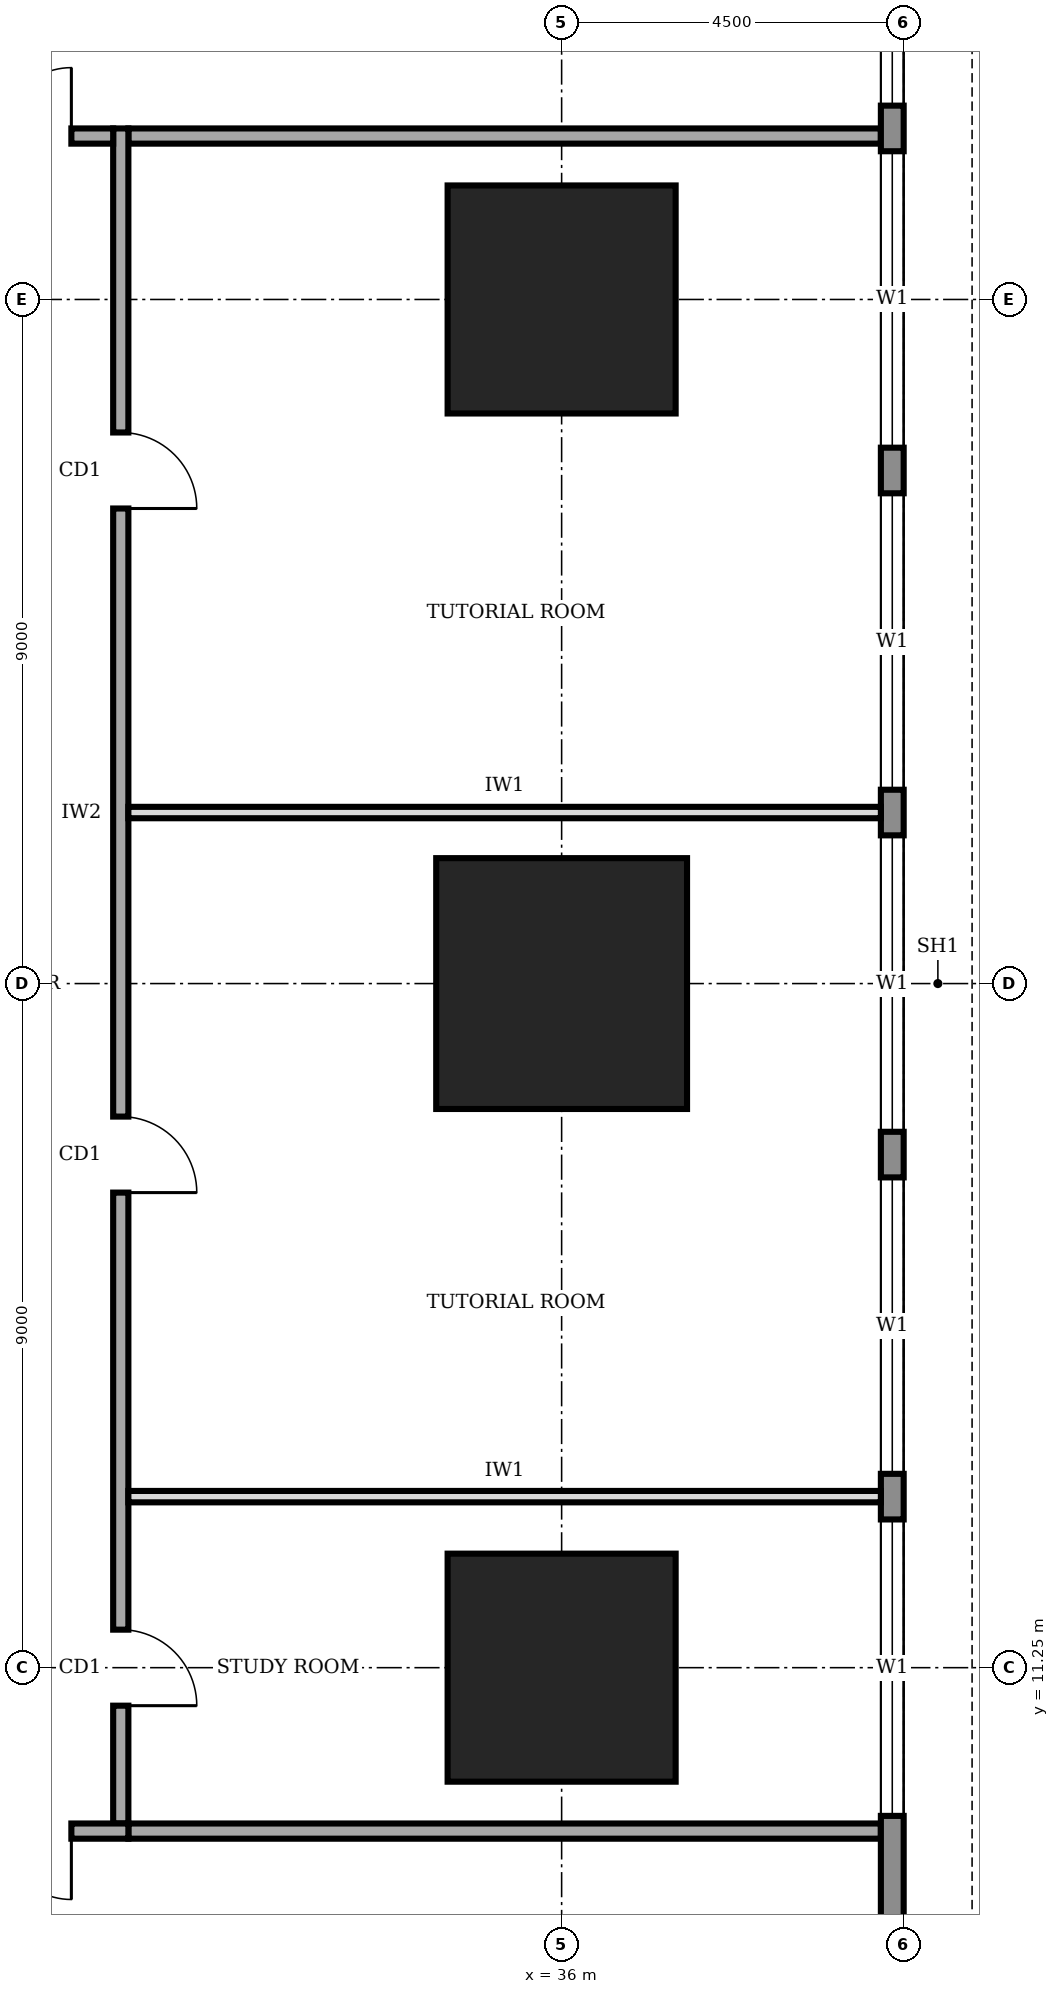
"""IFC4 building model, lengths in metres.
Left out: names, types, materials, properties, quantities, classifications, styles, units other than length and angle.
Written with IfcOpenShell. Run it as: python <this file> out.ifc"""

import sys

from ifc_helpers import new_model, si_unit, direction, frame, frame_2d, origin, origin_2d, place, context, subcontext, project, spatial, rectangle, extrude, element, fill, save


model = new_model("IFC4")
c1 = context("Model", 3, precision=1e-05, world=origin(), true_north=direction((0.0, 1.0)))
c2 = subcontext(c1, "Body", "Model", "MODEL_VIEW")
j1 = project(units=[si_unit("LENGTHUNIT", "METRE"), si_unit("PLANEANGLEUNIT", "RADIAN")], contexts=[c1])
p1 = place(None, origin())
s1 = spatial("IfcSite", under=j1, at=p1, CompositionType="ELEMENT")
p2 = place(p1, origin())
s2 = spatial("IfcBuilding", under=s1, at=p2, CompositionType="ELEMENT")
p3 = place(p2, frame((0.0, 0.0, 45.0)))
s3 = spatial("IfcBuildingStorey", under=s2, at=p3, CompositionType="ELEMENT", Elevation=45.0)
p4 = place(p3, frame((36.0, 11.25, 0.0), z_axis=(0.0, 0.0, 1.0), x_axis=(1.0, 0.0, 0.0)))
e1 = element("IfcColumn", 1, at=p4, inside=s3, PredefinedType="COLUMN", context=c2, shape_type="SweptSolid", body=[
    extrude(rectangle(XDim=3.0, YDim=3.0, at=origin_2d()), origin(), (0.0, 0.0, 1.0), 4.0),
])
p5 = place(p3, frame((36.0, 20.25, 0.0), z_axis=(0.0, 0.0, 1.0), x_axis=(1.0, 0.0, 0.0)))
e2 = element("IfcColumn", 2, at=p5, inside=s3, PredefinedType="COLUMN", context=c2, shape_type="SweptSolid", body=[
    extrude(rectangle(XDim=3.3, YDim=3.3, at=origin_2d()), origin(), (0.0, 0.0, 1.0), 4.0),
])
p6 = place(p3, frame((36.0, 29.25, 0.0), z_axis=(0.0, 0.0, 1.0), x_axis=(1.0, 0.0, 0.0)))
e3 = element("IfcColumn", 3, at=p6, inside=s3, PredefinedType="COLUMN", context=c2, shape_type="SweptSolid", body=[
    extrude(rectangle(XDim=3.0, YDim=3.0, at=origin_2d()), origin(), (0.0, 0.0, 1.0), 4.0),
])
p7 = place(p3, frame((40.35, 4.52, 0.0), z_axis=(0.0, 0.0, 1.0), x_axis=(0.0, 1.0, 0.0)))
e4 = element("IfcWall", 4, at=p7, inside=s3, PredefinedType="STANDARD", context=c2, shape_type="SweptSolid", body=[
    extrude(rectangle(XDim=31.46, YDim=0.3, at=frame_2d((15.73, 0.0))), origin(), (0.0, 0.0, 1.0), 3.75),
])
p8 = place(p7, frame((4.78, 0.0, 0.9)))
e5 = element("IfcOpeningElement", 5, at=p8, cuts=e4, PredefinedType="OPENING", context=c2, shape_type="SweptSolid", body=[
    extrude(rectangle(XDim=3.9, YDim=2.2, at=frame_2d((1.95, 1.1))), frame((0.0, 0.16, 0.0), z_axis=(0.0, -1.0, 0.0), x_axis=(1.0, 0.0, 0.0)), (0.0, 0.0, 1.0), 0.32),
])
p9 = place(p7, frame((9.28, 0.0, 0.9)))
e6 = element("IfcOpeningElement", 6, at=p9, cuts=e4, PredefinedType="OPENING", context=c2, shape_type="SweptSolid", body=[
    extrude(rectangle(XDim=3.9, YDim=2.2, at=frame_2d((1.95, 1.1))), frame((0.0, 0.16, 0.0), z_axis=(0.0, -1.0, 0.0), x_axis=(1.0, 0.0, 0.0)), (0.0, 0.0, 1.0), 0.32),
])
p10 = place(p7, frame((13.78, 0.0, 0.9)))
e7 = element("IfcOpeningElement", 7, at=p10, cuts=e4, PredefinedType="OPENING", context=c2, shape_type="SweptSolid", body=[
    extrude(rectangle(XDim=3.9, YDim=2.2, at=frame_2d((1.95, 1.1))), frame((0.0, 0.16, 0.0), z_axis=(0.0, -1.0, 0.0), x_axis=(1.0, 0.0, 0.0)), (0.0, 0.0, 1.0), 0.32),
])
p11 = place(p7, frame((18.28, 0.0, 0.9)))
e8 = element("IfcOpeningElement", 8, at=p11, cuts=e4, PredefinedType="OPENING", context=c2, shape_type="SweptSolid", body=[
    extrude(rectangle(XDim=3.9, YDim=2.2, at=frame_2d((1.95, 1.1))), frame((0.0, 0.16, 0.0), z_axis=(0.0, -1.0, 0.0), x_axis=(1.0, 0.0, 0.0)), (0.0, 0.0, 1.0), 0.32),
])
p12 = place(p7, frame((22.78, 0.0, 0.9)))
e9 = element("IfcOpeningElement", 9, at=p12, cuts=e4, PredefinedType="OPENING", context=c2, shape_type="SweptSolid", body=[
    extrude(rectangle(XDim=3.9, YDim=2.2, at=frame_2d((1.95, 1.1))), frame((0.0, 0.16, 0.0), z_axis=(0.0, -1.0, 0.0), x_axis=(1.0, 0.0, 0.0)), (0.0, 0.0, 1.0), 0.32),
])
p13 = place(p7, frame((27.28, 0.0, 0.9)))
e10 = element("IfcOpeningElement", 10, at=p13, cuts=e4, PredefinedType="OPENING", context=c2, shape_type="SweptSolid", body=[
    extrude(rectangle(XDim=3.9, YDim=2.2, at=frame_2d((1.95, 1.1))), frame((0.0, 0.16, 0.0), z_axis=(0.0, -1.0, 0.0), x_axis=(1.0, 0.0, 0.0)), (0.0, 0.0, 1.0), 0.32),
])
p14 = place(p3, frame((11.9, 9.1, 0.0), z_axis=(0.0, 0.0, 1.0), x_axis=(1.0, 0.0, 0.0)))
e11 = element("IfcWall", 11, at=p14, inside=s3, PredefinedType="SOLIDWALL", context=c2, shape_type="SweptSolid", body=[
    extrude(rectangle(XDim=18.4, YDim=0.2, at=frame_2d((9.2, 0.0))), origin(), (0.0, 0.0, 1.0), 3.75),
])
p15 = place(p14, frame((0.275, 0.0, 0.0)))
e12 = element("IfcOpeningElement", 12, at=p15, cuts=e11, PredefinedType="OPENING", context=c2, shape_type="SweptSolid", body=[
    extrude(rectangle(XDim=1.0, YDim=2.1, at=frame_2d((0.5, 1.05))), frame((0.0, 0.11, 0.0), z_axis=(0.0, -1.0, 0.0), x_axis=(1.0, 0.0, 0.0)), (0.0, 0.0, 1.0), 0.22),
])
p16 = place(p14, frame((3.35, 0.0, 0.0)))
e13 = element("IfcOpeningElement", 13, at=p16, cuts=e11, PredefinedType="OPENING", context=c2, shape_type="SweptSolid", body=[
    extrude(rectangle(XDim=1.0, YDim=2.1, at=frame_2d((0.5, 1.05))), frame((0.0, 0.11, 0.0), z_axis=(0.0, -1.0, 0.0), x_axis=(1.0, 0.0, 0.0)), (0.0, 0.0, 1.0), 0.22),
])
p17 = place(p14, frame((10.1, 0.0, 0.0)))
e14 = element("IfcOpeningElement", 14, at=p17, cuts=e11, PredefinedType="OPENING", context=c2, shape_type="SweptSolid", body=[
    extrude(rectangle(XDim=1.0, YDim=2.1, at=frame_2d((0.5, 1.05))), frame((0.0, 0.11, 0.0), z_axis=(0.0, -1.0, 0.0), x_axis=(1.0, 0.0, 0.0)), (0.0, 0.0, 1.0), 0.22),
])
p18 = place(p14, frame((15.85, 0.0, 0.0)))
e15 = element("IfcOpeningElement", 15, at=p18, cuts=e11, PredefinedType="OPENING", context=c2, shape_type="SweptSolid", body=[
    extrude(rectangle(XDim=1.8, YDim=2.1, at=frame_2d((0.9, 1.05))), frame((0.0, 0.11, 0.0), z_axis=(0.0, -1.0, 0.0), x_axis=(1.0, 0.0, 0.0)), (0.0, 0.0, 1.0), 0.22),
])
p19 = place(p3, frame((30.2, 9.2, 0.0), z_axis=(0.0, 0.0, 1.0), x_axis=(0.0, 1.0, 0.0)))
e16 = element("IfcWall", 16, at=p19, inside=s3, PredefinedType="SOLIDWALL", context=c2, shape_type="SweptSolid", body=[
    extrude(rectangle(XDim=22.3, YDim=0.2, at=frame_2d((11.15, 0.0))), origin(), (0.0, 0.0, 1.0), 3.75),
])
p20 = place(p19, frame((1.55, 0.0, 0.0)))
e17 = element("IfcOpeningElement", 17, at=p20, cuts=e16, PredefinedType="OPENING", context=c2, shape_type="SweptSolid", body=[
    extrude(rectangle(XDim=1.0, YDim=2.1, at=frame_2d((0.5, 1.05))), frame((0.0, 0.11, 0.0), z_axis=(0.0, -1.0, 0.0), x_axis=(1.0, 0.0, 0.0)), (0.0, 0.0, 1.0), 0.22),
])
p21 = place(p19, frame((8.3, 0.0, 0.0)))
e18 = element("IfcOpeningElement", 18, at=p21, cuts=e16, PredefinedType="OPENING", context=c2, shape_type="SweptSolid", body=[
    extrude(rectangle(XDim=1.0, YDim=2.1, at=frame_2d((0.5, 1.05))), frame((0.0, 0.11, 0.0), z_axis=(0.0, -1.0, 0.0), x_axis=(1.0, 0.0, 0.0)), (0.0, 0.0, 1.0), 0.22),
])
p22 = place(p19, frame((17.3, 0.0, 0.0)))
e19 = element("IfcOpeningElement", 19, at=p22, cuts=e16, PredefinedType="OPENING", context=c2, shape_type="SweptSolid", body=[
    extrude(rectangle(XDim=1.0, YDim=2.1, at=frame_2d((0.5, 1.05))), frame((0.0, 0.11, 0.0), z_axis=(0.0, -1.0, 0.0), x_axis=(1.0, 0.0, 0.0)), (0.0, 0.0, 1.0), 0.22),
])
p23 = place(p3, frame((30.1, 31.4, 0.0), z_axis=(0.0, 0.0, 1.0), x_axis=(-1.0, 0.0, 0.0)))
e20 = element("IfcWall", 20, at=p23, inside=s3, PredefinedType="SOLIDWALL", context=c2, shape_type="SweptSolid", body=[
    extrude(rectangle(XDim=18.4, YDim=0.2, at=frame_2d((9.2, 0.0))), origin(), (0.0, 0.0, 1.0), 3.75),
])
p24 = place(p23, frame((16.925, 0.0, 0.0)))
e21 = element("IfcOpeningElement", 21, at=p24, cuts=e20, PredefinedType="OPENING", context=c2, shape_type="SweptSolid", body=[
    extrude(rectangle(XDim=1.0, YDim=2.1, at=frame_2d((0.5, 1.05))), frame((0.0, 0.11, 0.0), z_axis=(0.0, -1.0, 0.0), x_axis=(1.0, 0.0, 0.0)), (0.0, 0.0, 1.0), 0.22),
])
p25 = place(p23, frame((13.85, 0.0, 0.0)))
e22 = element("IfcOpeningElement", 22, at=p25, cuts=e20, PredefinedType="OPENING", context=c2, shape_type="SweptSolid", body=[
    extrude(rectangle(XDim=1.0, YDim=2.1, at=frame_2d((0.5, 1.05))), frame((0.0, 0.11, 0.0), z_axis=(0.0, -1.0, 0.0), x_axis=(1.0, 0.0, 0.0)), (0.0, 0.0, 1.0), 0.22),
])
p26 = place(p23, frame((7.1, 0.0, 0.0)))
e23 = element("IfcOpeningElement", 23, at=p26, cuts=e20, PredefinedType="OPENING", context=c2, shape_type="SweptSolid", body=[
    extrude(rectangle(XDim=1.0, YDim=2.1, at=frame_2d((0.5, 1.05))), frame((0.0, 0.11, 0.0), z_axis=(0.0, -1.0, 0.0), x_axis=(1.0, 0.0, 0.0)), (0.0, 0.0, 1.0), 0.22),
])
p27 = place(p23, frame((0.55, 0.0, 0.0)))
e24 = element("IfcOpeningElement", 24, at=p27, cuts=e20, PredefinedType="OPENING", context=c2, shape_type="SweptSolid", body=[
    extrude(rectangle(XDim=1.8, YDim=2.1, at=frame_2d((0.9, 1.05))), frame((0.0, 0.11, 0.0), z_axis=(0.0, -1.0, 0.0), x_axis=(1.0, 0.0, 0.0)), (0.0, 0.0, 1.0), 0.22),
])
for number, where, z_axis, x_axis in (
    (25, (30.3, 9.1, 0.0), (0.0, 0.0, 1.0), (1.0, 0.0, 0.0)),
    (26, (30.3, 31.4, 0.0), (0.0, 0.0, 1.0), (1.0, 0.0, 0.0)),
):
    element("IfcWall", number, at=place(p3, frame(where, z_axis=z_axis, x_axis=x_axis)), inside=s3, PredefinedType="SOLIDWALL", context=c2, shape_type="SweptSolid", body=[
        extrude(rectangle(XDim=9.9, YDim=0.2, at=frame_2d((4.95, 0.0))), origin(), (0.0, 0.0, 1.0), 3.75),
    ])
for number, where, z_axis, x_axis in (
    (27, (30.3, 13.5, 0.0), (0.0, 0.0, 1.0), (1.0, 0.0, 0.0)),
    (28, (30.3, 22.5, 0.0), (0.0, 0.0, 1.0), (1.0, 0.0, 0.0)),
):
    element("IfcWall", number, at=place(p3, frame(where, z_axis=z_axis, x_axis=x_axis)), inside=s3, PredefinedType="PARTITIONING", context=c2, shape_type="SweptSolid", body=[
        extrude(rectangle(XDim=9.9, YDim=0.15, at=frame_2d((4.95, 0.0))), origin(), (0.0, 0.0, 1.0), 3.75),
    ])
p28 = place(p8, origin())
e29 = element("IfcWindow", 29, at=p28, inside=s3, PartitioningType="SINGLE_PANEL", PredefinedType="WINDOW", context=c2, shape_type="SweptSolid", body=[
    extrude(rectangle(XDim=3.9, YDim=2.2, at=frame_2d((1.95, 1.1))), frame((0.0, 0.03, 0.0), z_axis=(0.0, -1.0, 0.0), x_axis=(1.0, 0.0, 0.0)), (0.0, 0.0, 1.0), 0.06),
])
fill(e5, e29)
p29 = place(p9, origin())
e30 = element("IfcWindow", 30, at=p29, inside=s3, PartitioningType="SINGLE_PANEL", PredefinedType="WINDOW", context=c2, shape_type="SweptSolid", body=[
    extrude(rectangle(XDim=3.9, YDim=2.2, at=frame_2d((1.95, 1.1))), frame((0.0, 0.03, 0.0), z_axis=(0.0, -1.0, 0.0), x_axis=(1.0, 0.0, 0.0)), (0.0, 0.0, 1.0), 0.06),
])
fill(e6, e30)
p30 = place(p10, origin())
e31 = element("IfcWindow", 31, at=p30, inside=s3, PartitioningType="SINGLE_PANEL", PredefinedType="WINDOW", context=c2, shape_type="SweptSolid", body=[
    extrude(rectangle(XDim=3.9, YDim=2.2, at=frame_2d((1.95, 1.1))), frame((0.0, 0.03, 0.0), z_axis=(0.0, -1.0, 0.0), x_axis=(1.0, 0.0, 0.0)), (0.0, 0.0, 1.0), 0.06),
])
fill(e7, e31)
p31 = place(p11, origin())
e32 = element("IfcWindow", 32, at=p31, inside=s3, PartitioningType="SINGLE_PANEL", PredefinedType="WINDOW", context=c2, shape_type="SweptSolid", body=[
    extrude(rectangle(XDim=3.9, YDim=2.2, at=frame_2d((1.95, 1.1))), frame((0.0, 0.03, 0.0), z_axis=(0.0, -1.0, 0.0), x_axis=(1.0, 0.0, 0.0)), (0.0, 0.0, 1.0), 0.06),
])
fill(e8, e32)
p32 = place(p12, origin())
e33 = element("IfcWindow", 33, at=p32, inside=s3, PartitioningType="SINGLE_PANEL", PredefinedType="WINDOW", context=c2, shape_type="SweptSolid", body=[
    extrude(rectangle(XDim=3.9, YDim=2.2, at=frame_2d((1.95, 1.1))), frame((0.0, 0.03, 0.0), z_axis=(0.0, -1.0, 0.0), x_axis=(1.0, 0.0, 0.0)), (0.0, 0.0, 1.0), 0.06),
])
fill(e9, e33)
p33 = place(p13, origin())
e34 = element("IfcWindow", 34, at=p33, inside=s3, PartitioningType="SINGLE_PANEL", PredefinedType="WINDOW", context=c2, shape_type="SweptSolid", body=[
    extrude(rectangle(XDim=3.9, YDim=2.2, at=frame_2d((1.95, 1.1))), frame((0.0, 0.03, 0.0), z_axis=(0.0, -1.0, 0.0), x_axis=(1.0, 0.0, 0.0)), (0.0, 0.0, 1.0), 0.06),
])
fill(e10, e34)
p34 = place(p18, frame((1.8, 0.0, 0.0), z_axis=(0.0, 0.0, 1.0), x_axis=(-1.0, 0.0, 0.0)))
e35 = element("IfcDoor", 35, at=p34, inside=s3, OperationType="DOUBLE_DOOR_SINGLE_SWING", PredefinedType="DOOR", context=c2, shape_type="SweptSolid", body=[
    extrude(rectangle(XDim=1.8, YDim=2.1, at=frame_2d((0.9, 1.05))), frame((0.0, 0.025, 0.0), z_axis=(0.0, -1.0, 0.0), x_axis=(1.0, 0.0, 0.0)), (0.0, 0.0, 1.0), 0.05),
])
fill(e15, e35)
p35 = place(p20, frame((1.0, 0.0, 0.0), z_axis=(0.0, 0.0, 1.0), x_axis=(-1.0, 0.0, 0.0)))
e36 = element("IfcDoor", 36, at=p35, inside=s3, OperationType="SINGLE_SWING_RIGHT", PredefinedType="DOOR", context=c2, shape_type="SweptSolid", body=[
    extrude(rectangle(XDim=1.0, YDim=2.1, at=frame_2d((0.5, 1.05))), frame((0.0, 0.025, 0.0), z_axis=(0.0, -1.0, 0.0), x_axis=(1.0, 0.0, 0.0)), (0.0, 0.0, 1.0), 0.05),
])
fill(e17, e36)
p36 = place(p21, frame((1.0, 0.0, 0.0), z_axis=(0.0, 0.0, 1.0), x_axis=(-1.0, 0.0, 0.0)))
e37 = element("IfcDoor", 37, at=p36, inside=s3, OperationType="SINGLE_SWING_RIGHT", PredefinedType="DOOR", context=c2, shape_type="SweptSolid", body=[
    extrude(rectangle(XDim=1.0, YDim=2.1, at=frame_2d((0.5, 1.05))), frame((0.0, 0.025, 0.0), z_axis=(0.0, -1.0, 0.0), x_axis=(1.0, 0.0, 0.0)), (0.0, 0.0, 1.0), 0.05),
])
fill(e18, e37)
p37 = place(p22, frame((1.0, 0.0, 0.0), z_axis=(0.0, 0.0, 1.0), x_axis=(-1.0, 0.0, 0.0)))
e38 = element("IfcDoor", 38, at=p37, inside=s3, OperationType="SINGLE_SWING_RIGHT", PredefinedType="DOOR", context=c2, shape_type="SweptSolid", body=[
    extrude(rectangle(XDim=1.0, YDim=2.1, at=frame_2d((0.5, 1.05))), frame((0.0, 0.025, 0.0), z_axis=(0.0, -1.0, 0.0), x_axis=(1.0, 0.0, 0.0)), (0.0, 0.0, 1.0), 0.05),
])
fill(e19, e38)
p38 = place(p27, frame((1.8, 0.0, 0.0), z_axis=(0.0, 0.0, 1.0), x_axis=(-1.0, 0.0, 0.0)))
e39 = element("IfcDoor", 39, at=p38, inside=s3, OperationType="DOUBLE_DOOR_SINGLE_SWING", PredefinedType="DOOR", context=c2, shape_type="SweptSolid", body=[
    extrude(rectangle(XDim=1.8, YDim=2.1, at=frame_2d((0.9, 1.05))), frame((0.0, 0.025, 0.0), z_axis=(0.0, -1.0, 0.0), x_axis=(1.0, 0.0, 0.0)), (0.0, 0.0, 1.0), 0.05),
])
fill(e24, e39)
save(model, sys.argv[1])
